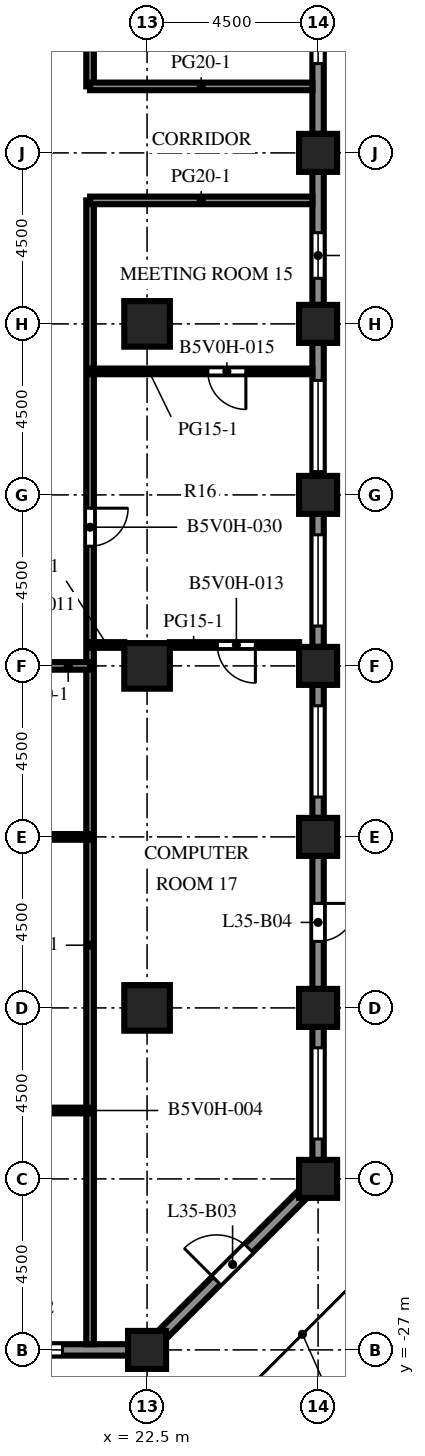
"""IFC4 building model, lengths in metres.
Left out: names, types, materials, properties, quantities, classifications, styles, units other than length and angle.
Written with IfcOpenShell. Run it as: python <this file> out.ifc"""

import sys

from ifc_helpers import new_model, si_unit, direction, frame, frame_2d, origin, origin_2d, place, context, subcontext, project, spatial, rectangle, extrude, element, fill, save


model = new_model("IFC4")
c1 = context("Model", 3, precision=1e-05, world=origin(), true_north=direction((0.0, 1.0)))
c2 = subcontext(c1, "Body", "Model", "MODEL_VIEW")
j1 = project(units=[si_unit("LENGTHUNIT", "METRE"), si_unit("PLANEANGLEUNIT", "RADIAN")], contexts=[c1])
p1 = place(None, origin())
s1 = spatial("IfcSite", under=j1, at=p1, CompositionType="ELEMENT")
p2 = place(p1, origin())
s2 = spatial("IfcBuilding", under=s1, at=p2, CompositionType="ELEMENT")
p3 = place(p2, frame((0.0, 0.0, 156.8)))
s3 = spatial("IfcBuildingStorey", under=s2, at=p3, CompositionType="ELEMENT", Elevation=156.8)
p4 = place(p3, frame((22.5, -27.0, -0.45), z_axis=(0.0, 0.0, 1.0), x_axis=(1.0, 0.0, 0.0)))
e1 = element("IfcColumn", 1, at=p4, inside=s3, PredefinedType="COLUMN", context=c2, shape_type="SweptSolid", body=[
    extrude(rectangle(XDim=1.0, YDim=1.0, at=origin_2d()), origin(), (0.0, 0.0, 1.0), 4.55),
])
for number, where, z_axis, x_axis in (
    (2, (27.0, -22.5, 0.0), (0.0, 0.0, 1.0), (1.0, 0.0, 0.0)),
    (3, (27.0, -18.0, 0.0), (0.0, 0.0, 1.0), (1.0, 0.0, 0.0)),
    (4, (27.0, -13.5, 0.0), (0.0, 0.0, 1.0), (1.0, 0.0, 0.0)),
    (5, (27.0, -9.0, 0.0), (0.0, 0.0, 1.0), (1.0, 0.0, 0.0)),
    (6, (27.0, -4.5, 0.0), (0.0, 0.0, 1.0), (1.0, 0.0, 0.0)),
    (7, (27.0, 0.0, 0.0), (0.0, 0.0, 1.0), (1.0, 0.0, 0.0)),
    (8, (27.0, 4.5, 0.0), (0.0, 0.0, 1.0), (1.0, 0.0, 0.0)),
):
    element("IfcColumn", number, at=place(p3, frame(where, z_axis=z_axis, x_axis=x_axis)), inside=s3, PredefinedType="COLUMN", context=c2, shape_type="SweptSolid", body=[
        extrude(rectangle(XDim=1.0, YDim=1.0, at=origin_2d()), origin(), (0.0, 0.0, 1.0), 4.1),
    ])
for number, where, z_axis, x_axis in (
    (9, (22.5, -18.0, 0.0), (0.0, 0.0, 1.0), (1.0, 0.0, 0.0)),
    (10, (22.5, -9.0, 0.0), (0.0, 0.0, 1.0), (1.0, 0.0, 0.0)),
    (11, (22.5, 0.0, 0.0), (0.0, 0.0, 1.0), (1.0, 0.0, 0.0)),
):
    element("IfcColumn", number, at=place(p3, frame(where, z_axis=z_axis, x_axis=x_axis)), inside=s3, PredefinedType="COLUMN", context=c2, shape_type="SweptSolid", body=[
        extrude(rectangle(XDim=1.2, YDim=1.2, at=origin_2d()), origin(), (0.0, 0.0, 1.0), 4.1),
    ])
p5 = place(p3, frame((22.0, -27.0, 0.0), z_axis=(0.0, 0.0, 1.0), x_axis=(-1.0, 0.0, 0.0)))
e12 = element("IfcWall", 12, at=p5, inside=s3, PredefinedType="SOLIDWALL", context=c2, shape_type="SweptSolid", body=[
    extrude(rectangle(XDim=3.5, YDim=0.3, at=frame_2d((1.75, 0.0))), origin(), (0.0, 0.0, 1.0), 2.85),
])
p6 = place(p5, frame((1.725, 0.0, 0.8)))
e13 = element("IfcOpeningElement", 13, at=p6, cuts=e12, PredefinedType="OPENING", context=c2, shape_type="SweptSolid", body=[
    extrude(rectangle(XDim=1.2, YDim=1.7, at=frame_2d((0.6, 0.85))), frame((0.0, 0.16, 0.0), z_axis=(0.0, -1.0, 0.0), x_axis=(1.0, 0.0, 0.0)), (0.0, 0.0, 1.0), 0.32),
])
p7 = place(p3, frame((26.606, -22.894, 0.0), z_axis=(0.0, 0.0, 1.0), x_axis=(-0.707106781187, -0.707106781187, 0.0)))
e14 = element("IfcWall", 14, at=p7, inside=s3, PredefinedType="SOLIDWALL", context=c2, shape_type="SweptSolid", body=[
    extrude(rectangle(XDim=5.25, YDim=0.3, at=frame_2d((2.625, 0.0))), origin(), (0.0, 0.0, 1.0), 2.85),
])
p8 = place(p7, frame((2.025, 0.0, 0.0)))
e15 = element("IfcOpeningElement", 15, at=p8, cuts=e14, PredefinedType="OPENING", context=c2, shape_type="SweptSolid", body=[
    extrude(rectangle(XDim=1.2, YDim=2.2, at=frame_2d((0.6, 1.1))), frame((0.0, 0.16, 0.0), z_axis=(0.0, -1.0, 0.0), x_axis=(1.0, 0.0, 0.0)), (0.0, 0.0, 1.0), 0.32),
])
p9 = place(p3, frame((27.0, -18.5, 0.0), z_axis=(0.0, 0.0, 1.0), x_axis=(0.0, -1.0, 0.0)))
e16 = element("IfcWall", 16, at=p9, inside=s3, PredefinedType="SOLIDWALL", context=c2, shape_type="SweptSolid", body=[
    extrude(rectangle(XDim=3.5, YDim=0.3, at=frame_2d((1.75, 0.0))), origin(), (0.0, 0.0, 1.0), 2.85),
])
p10 = place(p9, frame((0.55, 0.0, 0.8)))
e17 = element("IfcOpeningElement", 17, at=p10, cuts=e16, PredefinedType="OPENING", context=c2, shape_type="SweptSolid", body=[
    extrude(rectangle(XDim=2.4, YDim=1.7, at=frame_2d((1.2, 0.85))), frame((0.0, 0.16, 0.0), z_axis=(0.0, -1.0, 0.0), x_axis=(1.0, 0.0, 0.0)), (0.0, 0.0, 1.0), 0.32),
])
p11 = place(p3, frame((27.0, -14.0, 0.0), z_axis=(0.0, 0.0, 1.0), x_axis=(0.0, -1.0, 0.0)))
e18 = element("IfcWall", 18, at=p11, inside=s3, PredefinedType="SOLIDWALL", context=c2, shape_type="SweptSolid", body=[
    extrude(rectangle(XDim=3.5, YDim=0.3, at=frame_2d((1.75, 0.0))), origin(), (0.0, 0.0, 1.0), 2.85),
])
p12 = place(p11, frame((1.25, 0.0, 0.0)))
e19 = element("IfcOpeningElement", 19, at=p12, cuts=e18, PredefinedType="OPENING", context=c2, shape_type="SweptSolid", body=[
    extrude(rectangle(XDim=1.0, YDim=2.2, at=frame_2d((0.5, 1.1))), frame((0.0, 0.16, 0.0), z_axis=(0.0, -1.0, 0.0), x_axis=(1.0, 0.0, 0.0)), (0.0, 0.0, 1.0), 0.32),
])
p13 = place(p3, frame((27.0, -9.5, 0.0), z_axis=(0.0, 0.0, 1.0), x_axis=(0.0, -1.0, 0.0)))
e20 = element("IfcWall", 20, at=p13, inside=s3, PredefinedType="SOLIDWALL", context=c2, shape_type="SweptSolid", body=[
    extrude(rectangle(XDim=3.5, YDim=0.3, at=frame_2d((1.75, 0.0))), origin(), (0.0, 0.0, 1.0), 2.85),
])
p14 = place(p13, frame((0.55, 0.0, 0.8)))
e21 = element("IfcOpeningElement", 21, at=p14, cuts=e20, PredefinedType="OPENING", context=c2, shape_type="SweptSolid", body=[
    extrude(rectangle(XDim=2.4, YDim=1.7, at=frame_2d((1.2, 0.85))), frame((0.0, 0.16, 0.0), z_axis=(0.0, -1.0, 0.0), x_axis=(1.0, 0.0, 0.0)), (0.0, 0.0, 1.0), 0.32),
])
p15 = place(p3, frame((27.0, -5.0, 0.0), z_axis=(0.0, 0.0, 1.0), x_axis=(0.0, -1.0, 0.0)))
e22 = element("IfcWall", 22, at=p15, inside=s3, PredefinedType="SOLIDWALL", context=c2, shape_type="SweptSolid", body=[
    extrude(rectangle(XDim=3.5, YDim=0.3, at=frame_2d((1.75, 0.0))), origin(), (0.0, 0.0, 1.0), 2.85),
])
p16 = place(p15, frame((0.55, 0.0, 0.8)))
e23 = element("IfcOpeningElement", 23, at=p16, cuts=e22, PredefinedType="OPENING", context=c2, shape_type="SweptSolid", body=[
    extrude(rectangle(XDim=2.4, YDim=1.7, at=frame_2d((1.2, 0.85))), frame((0.0, 0.16, 0.0), z_axis=(0.0, -1.0, 0.0), x_axis=(1.0, 0.0, 0.0)), (0.0, 0.0, 1.0), 0.32),
])
p17 = place(p3, frame((27.0, -0.5, 0.0), z_axis=(0.0, 0.0, 1.0), x_axis=(0.0, -1.0, 0.0)))
e24 = element("IfcWall", 24, at=p17, inside=s3, PredefinedType="SOLIDWALL", context=c2, shape_type="SweptSolid", body=[
    extrude(rectangle(XDim=3.5, YDim=0.3, at=frame_2d((1.75, 0.0))), origin(), (0.0, 0.0, 1.0), 2.85),
])
p18 = place(p17, frame((0.988, 0.0, 0.8)))
e25 = element("IfcOpeningElement", 25, at=p18, cuts=e24, PredefinedType="OPENING", context=c2, shape_type="SweptSolid", body=[
    extrude(rectangle(XDim=2.4, YDim=1.7, at=frame_2d((1.2, 0.85))), frame((0.0, 0.16, 0.0), z_axis=(0.0, -1.0, 0.0), x_axis=(1.0, 0.0, 0.0)), (0.0, 0.0, 1.0), 0.32),
])
p19 = place(p3, frame((27.0, 4.0, 0.0), z_axis=(0.0, 0.0, 1.0), x_axis=(0.0, -1.0, 0.0)))
e26 = element("IfcWall", 26, at=p19, inside=s3, PredefinedType="SOLIDWALL", context=c2, shape_type="SweptSolid", body=[
    extrude(rectangle(XDim=3.5, YDim=0.3, at=frame_2d((1.75, 0.0))), origin(), (0.0, 0.0, 1.0), 2.85),
])
p20 = place(p19, frame((1.6, 0.0, 0.8)))
e27 = element("IfcOpeningElement", 27, at=p20, cuts=e26, PredefinedType="OPENING", context=c2, shape_type="SweptSolid", body=[
    extrude(rectangle(XDim=1.2, YDim=1.7, at=frame_2d((0.6, 0.85))), frame((0.0, 0.16, 0.0), z_axis=(0.0, -1.0, 0.0), x_axis=(1.0, 0.0, 0.0)), (0.0, 0.0, 1.0), 0.32),
])
p21 = place(p3, frame((27.0, 8.5, 0.0), z_axis=(0.0, 0.0, 1.0), x_axis=(0.0, -1.0, 0.0)))
e28 = element("IfcWall", 28, at=p21, inside=s3, PredefinedType="SOLIDWALL", context=c2, shape_type="SweptSolid", body=[
    extrude(rectangle(XDim=3.5, YDim=0.3, at=frame_2d((1.75, 0.0))), origin(), (0.0, 0.0, 1.0), 2.85),
])
p22 = place(p21, frame((0.45, 0.0, 0.8)))
e29 = element("IfcOpeningElement", 29, at=p22, cuts=e28, PredefinedType="OPENING", context=c2, shape_type="SweptSolid", body=[
    extrude(rectangle(XDim=1.2, YDim=1.7, at=frame_2d((0.6, 0.85))), frame((0.0, 0.16, 0.0), z_axis=(0.0, -1.0, 0.0), x_axis=(1.0, 0.0, 0.0)), (0.0, 0.0, 1.0), 0.32),
])
p23 = place(p3, frame((21.0, 3.25, 0.0), z_axis=(0.0, 0.0, 1.0), x_axis=(0.0, -1.0, 0.0)))
e30 = element("IfcWall", 30, at=p23, inside=s3, PredefinedType="PARTITIONING", context=c2, shape_type="SweptSolid", body=[
    extrude(rectangle(XDim=30.1, YDim=0.2, at=frame_2d((15.05, 0.0))), origin(), (0.0, 0.0, 1.0), 3.65),
])
p24 = place(p23, frame((8.1, 0.0, 0.0)))
e31 = element("IfcOpeningElement", 31, at=p24, cuts=e30, PredefinedType="OPENING", context=c2, shape_type="SweptSolid", body=[
    extrude(rectangle(XDim=1.0, YDim=2.1, at=frame_2d((0.5, 1.05))), frame((0.0, 0.11, 0.0), z_axis=(0.0, -1.0, 0.0), x_axis=(1.0, 0.0, 0.0)), (0.0, 0.0, 1.0), 0.22),
])
p25 = place(p3, frame((21.0, 26.85, 0.0), z_axis=(0.0, 0.0, 1.0), x_axis=(0.0, -1.0, 0.0)))
e32 = element("IfcWall", 32, at=p25, inside=s3, PredefinedType="PARTITIONING", context=c2, shape_type="SweptSolid", body=[
    extrude(rectangle(XDim=20.6, YDim=0.2, at=frame_2d((10.3, 0.0))), origin(), (0.0, 0.0, 1.0), 3.65),
])
p26 = place(p25, frame((11.25, 0.0, 0.0)))
e33 = element("IfcOpeningElement", 33, at=p26, cuts=e32, PredefinedType="OPENING", context=c2, shape_type="SweptSolid", body=[
    extrude(rectangle(XDim=1.0, YDim=2.1, at=frame_2d((0.5, 1.05))), frame((0.0, 0.11, 0.0), z_axis=(0.0, -1.0, 0.0), x_axis=(1.0, 0.0, 0.0)), (0.0, 0.0, 1.0), 0.22),
])
p27 = place(p3, frame((21.0, -20.7, 0.0), z_axis=(0.0, 0.0, 1.0), x_axis=(-1.0, 0.0, 0.0)))
e34 = element("IfcWall", 34, at=p27, inside=s3, PredefinedType="PARTITIONING", context=c2, shape_type="SweptSolid", body=[
    extrude(rectangle(XDim=34.5, YDim=0.15, at=frame_2d((17.25, 0.0))), origin(), (0.0, 0.0, 1.0), 3.65),
])
p28 = place(p27, frame((26.9, 0.0, 0.0)))
e35 = element("IfcOpeningElement", 35, at=p28, cuts=e34, PredefinedType="OPENING", context=c2, shape_type="SweptSolid", body=[
    extrude(rectangle(XDim=1.0, YDim=2.1, at=frame_2d((0.5, 1.05))), frame((0.0, 0.085, 0.0), z_axis=(0.0, -1.0, 0.0), x_axis=(1.0, 0.0, 0.0)), (0.0, 0.0, 1.0), 0.17),
])
p29 = place(p27, frame((18.25, 0.0, 0.0)))
e36 = element("IfcOpeningElement", 36, at=p29, cuts=e34, PredefinedType="OPENING", context=c2, shape_type="SweptSolid", body=[
    extrude(rectangle(XDim=1.0, YDim=2.1, at=frame_2d((0.5, 1.05))), frame((0.0, 0.085, 0.0), z_axis=(0.0, -1.0, 0.0), x_axis=(1.0, 0.0, 0.0)), (0.0, 0.0, 1.0), 0.17),
])
p30 = place(p27, frame((12.65, 0.0, 0.0)))
e37 = element("IfcOpeningElement", 37, at=p30, cuts=e34, PredefinedType="OPENING", context=c2, shape_type="SweptSolid", body=[
    extrude(rectangle(XDim=1.0, YDim=2.1, at=frame_2d((0.5, 1.05))), frame((0.0, 0.085, 0.0), z_axis=(0.0, -1.0, 0.0), x_axis=(1.0, 0.0, 0.0)), (0.0, 0.0, 1.0), 0.17),
])
p31 = place(p27, frame((1.4, 0.0, 0.0)))
e38 = element("IfcOpeningElement", 38, at=p31, cuts=e34, PredefinedType="OPENING", context=c2, shape_type="SweptSolid", body=[
    extrude(rectangle(XDim=1.0, YDim=2.1, at=frame_2d((0.5, 1.05))), frame((0.0, 0.085, 0.0), z_axis=(0.0, -1.0, 0.0), x_axis=(1.0, 0.0, 0.0)), (0.0, 0.0, 1.0), 0.17),
])
p32 = place(p3, frame((21.0, -13.5, 0.0), z_axis=(0.0, 0.0, 1.0), x_axis=(-1.0, 0.0, 0.0)))
e39 = element("IfcWall", 39, at=p32, inside=s3, PredefinedType="PARTITIONING", context=c2, shape_type="SweptSolid", body=[
    extrude(rectangle(XDim=34.5, YDim=0.15, at=frame_2d((17.25, 0.0))), origin(), (0.0, 0.0, 1.0), 3.65),
])
p33 = place(p32, frame((27.4, 0.0, 0.0)))
e40 = element("IfcOpeningElement", 40, at=p33, cuts=e39, PredefinedType="OPENING", context=c2, shape_type="SweptSolid", body=[
    extrude(rectangle(XDim=1.0, YDim=2.1, at=frame_2d((0.5, 1.05))), frame((0.0, 0.085, 0.0), z_axis=(0.0, -1.0, 0.0), x_axis=(1.0, 0.0, 0.0)), (0.0, 0.0, 1.0), 0.17),
])
p34 = place(p32, frame((17.5, 0.0, 0.0)))
e41 = element("IfcOpeningElement", 41, at=p34, cuts=e39, PredefinedType="OPENING", context=c2, shape_type="SweptSolid", body=[
    extrude(rectangle(XDim=1.0, YDim=2.1, at=frame_2d((0.5, 1.05))), frame((0.0, 0.085, 0.0), z_axis=(0.0, -1.0, 0.0), x_axis=(1.0, 0.0, 0.0)), (0.0, 0.0, 1.0), 0.17),
])
p35 = place(p32, frame((10.4, 0.0, 0.0)))
e42 = element("IfcOpeningElement", 42, at=p35, cuts=e39, PredefinedType="OPENING", context=c2, shape_type="SweptSolid", body=[
    extrude(rectangle(XDim=1.0, YDim=2.1, at=frame_2d((0.5, 1.05))), frame((0.0, 0.085, 0.0), z_axis=(0.0, -1.0, 0.0), x_axis=(1.0, 0.0, 0.0)), (0.0, 0.0, 1.0), 0.17),
])
p36 = place(p32, frame((3.65, 0.0, 0.0)))
e43 = element("IfcOpeningElement", 43, at=p36, cuts=e39, PredefinedType="OPENING", context=c2, shape_type="SweptSolid", body=[
    extrude(rectangle(XDim=1.0, YDim=2.1, at=frame_2d((0.5, 1.05))), frame((0.0, 0.085, 0.0), z_axis=(0.0, -1.0, 0.0), x_axis=(1.0, 0.0, 0.0)), (0.0, 0.0, 1.0), 0.17),
])
p37 = place(p3, frame((21.0, -9.0, 0.0), z_axis=(0.0, 0.0, 1.0), x_axis=(-1.0, 0.0, 0.0)))
e44 = element("IfcWall", 44, at=p37, inside=s3, PredefinedType="PARTITIONING", context=c2, shape_type="SweptSolid", body=[
    extrude(rectangle(XDim=3.0, YDim=0.2, at=frame_2d((1.5, 0.0))), origin(), (0.0, 0.0, 1.0), 3.65),
])
p38 = place(p37, frame((1.15, 0.0, 0.0)))
e45 = element("IfcOpeningElement", 45, at=p38, cuts=e44, PredefinedType="OPENING", context=c2, shape_type="SweptSolid", body=[
    extrude(rectangle(XDim=1.0, YDim=2.1, at=frame_2d((0.5, 1.05))), frame((0.0, 0.11, 0.0), z_axis=(0.0, -1.0, 0.0), x_axis=(1.0, 0.0, 0.0)), (0.0, 0.0, 1.0), 0.22),
])
p39 = place(p3, frame((21.0, -8.45, 0.0), z_axis=(0.0, 0.0, 1.0), x_axis=(1.0, 0.0, 0.0)))
e46 = element("IfcWall", 46, at=p39, inside=s3, PredefinedType="PARTITIONING", context=c2, shape_type="SweptSolid", body=[
    extrude(rectangle(XDim=0.9, YDim=0.15, at=frame_2d((0.45, 0.0))), origin(), (0.0, 0.0, 1.0), 3.65),
])
p40 = place(p3, frame((26.5, -8.45, 0.0), z_axis=(0.0, 0.0, 1.0), x_axis=(-1.0, 0.0, 0.0)))
e47 = element("IfcWall", 47, at=p40, inside=s3, PredefinedType="PARTITIONING", context=c2, shape_type="SweptSolid", body=[
    extrude(rectangle(XDim=3.4, YDim=0.15, at=frame_2d((1.7, 0.0))), origin(), (0.0, 0.0, 1.0), 3.65),
])
p41 = place(p40, frame((1.15, 0.0, 0.0)))
e48 = element("IfcOpeningElement", 48, at=p41, cuts=e47, PredefinedType="OPENING", context=c2, shape_type="SweptSolid", body=[
    extrude(rectangle(XDim=1.0, YDim=2.1, at=frame_2d((0.5, 1.05))), frame((0.0, 0.085, 0.0), z_axis=(0.0, -1.0, 0.0), x_axis=(1.0, 0.0, 0.0)), (0.0, 0.0, 1.0), 0.17),
])
p42 = place(p3, frame((21.0, -1.25, 0.0), z_axis=(0.0, 0.0, 1.0), x_axis=(1.0, 0.0, 0.0)))
e49 = element("IfcWall", 49, at=p42, inside=s3, PredefinedType="PARTITIONING", context=c2, shape_type="SweptSolid", body=[
    extrude(rectangle(XDim=5.85, YDim=0.15, at=frame_2d((2.925, 0.0))), origin(), (0.0, 0.0, 1.0), 3.65),
])
p43 = place(p42, frame((3.1, 0.0, 0.0)))
e50 = element("IfcOpeningElement", 50, at=p43, cuts=e49, PredefinedType="OPENING", context=c2, shape_type="SweptSolid", body=[
    extrude(rectangle(XDim=1.0, YDim=2.1, at=frame_2d((0.5, 1.05))), frame((0.0, 0.085, 0.0), z_axis=(0.0, -1.0, 0.0), x_axis=(1.0, 0.0, 0.0)), (0.0, 0.0, 1.0), 0.17),
])
for number, where, z_axis, x_axis in (
    (51, (21.0, 3.25, 0.0), (0.0, 0.0, 1.0), (1.0, 0.0, 0.0)),
    (52, (21.0, 6.25, 0.0), (0.0, 0.0, 1.0), (1.0, 0.0, 0.0)),
):
    element("IfcWall", number, at=place(p3, frame(where, z_axis=z_axis, x_axis=x_axis)), inside=s3, PredefinedType="PARTITIONING", context=c2, shape_type="SweptSolid", body=[
        extrude(rectangle(XDim=5.85, YDim=0.2, at=frame_2d((2.925, 0.0))), origin(), (0.0, 0.0, 1.0), 3.65),
    ])
p44 = place(p6, origin())
e53 = element("IfcWindow", 53, at=p44, inside=s3, PartitioningType="SINGLE_PANEL", PredefinedType="WINDOW", context=c2, shape_type="SweptSolid", body=[
    extrude(rectangle(XDim=1.2, YDim=1.7, at=frame_2d((0.6, 0.85))), frame((0.0, 0.03, 0.0), z_axis=(0.0, -1.0, 0.0), x_axis=(1.0, 0.0, 0.0)), (0.0, 0.0, 1.0), 0.06),
])
fill(e13, e53)
p45 = place(p8, origin())
e54 = element("IfcDoor", 54, at=p45, inside=s3, OperationType="SINGLE_SWING_RIGHT", PredefinedType="DOOR", context=c2, shape_type="SweptSolid", body=[
    extrude(rectangle(XDim=1.2, YDim=2.2, at=frame_2d((0.6, 1.1))), frame((0.0, 0.025, 0.0), z_axis=(0.0, -1.0, 0.0), x_axis=(1.0, 0.0, 0.0)), (0.0, 0.0, 1.0), 0.05),
])
fill(e15, e54)
p46 = place(p10, origin())
e55 = element("IfcWindow", 55, at=p46, inside=s3, PartitioningType="SINGLE_PANEL", PredefinedType="WINDOW", context=c2, shape_type="SweptSolid", body=[
    extrude(rectangle(XDim=2.4, YDim=1.7, at=frame_2d((1.2, 0.85))), frame((0.0, 0.03, 0.0), z_axis=(0.0, -1.0, 0.0), x_axis=(1.0, 0.0, 0.0)), (0.0, 0.0, 1.0), 0.06),
])
fill(e17, e55)
p47 = place(p12, origin())
e56 = element("IfcDoor", 56, at=p47, inside=s3, OperationType="SINGLE_SWING_LEFT", PredefinedType="DOOR", context=c2, shape_type="SweptSolid", body=[
    extrude(rectangle(XDim=1.0, YDim=2.2, at=frame_2d((0.5, 1.1))), frame((0.0, 0.025, 0.0), z_axis=(0.0, -1.0, 0.0), x_axis=(1.0, 0.0, 0.0)), (0.0, 0.0, 1.0), 0.05),
])
fill(e19, e56)
p48 = place(p14, origin())
e57 = element("IfcWindow", 57, at=p48, inside=s3, PartitioningType="SINGLE_PANEL", PredefinedType="WINDOW", context=c2, shape_type="SweptSolid", body=[
    extrude(rectangle(XDim=2.4, YDim=1.7, at=frame_2d((1.2, 0.85))), frame((0.0, 0.03, 0.0), z_axis=(0.0, -1.0, 0.0), x_axis=(1.0, 0.0, 0.0)), (0.0, 0.0, 1.0), 0.06),
])
fill(e21, e57)
p49 = place(p16, origin())
e58 = element("IfcWindow", 58, at=p49, inside=s3, PartitioningType="SINGLE_PANEL", PredefinedType="WINDOW", context=c2, shape_type="SweptSolid", body=[
    extrude(rectangle(XDim=2.4, YDim=1.7, at=frame_2d((1.2, 0.85))), frame((0.0, 0.03, 0.0), z_axis=(0.0, -1.0, 0.0), x_axis=(1.0, 0.0, 0.0)), (0.0, 0.0, 1.0), 0.06),
])
fill(e23, e58)
p50 = place(p18, origin())
e59 = element("IfcWindow", 59, at=p50, inside=s3, PartitioningType="SINGLE_PANEL", PredefinedType="WINDOW", context=c2, shape_type="SweptSolid", body=[
    extrude(rectangle(XDim=2.4, YDim=1.7, at=frame_2d((1.2, 0.85))), frame((0.0, 0.03, 0.0), z_axis=(0.0, -1.0, 0.0), x_axis=(1.0, 0.0, 0.0)), (0.0, 0.0, 1.0), 0.06),
])
fill(e25, e59)
p51 = place(p20, origin())
e60 = element("IfcWindow", 60, at=p51, inside=s3, PartitioningType="SINGLE_PANEL", PredefinedType="WINDOW", context=c2, shape_type="SweptSolid", body=[
    extrude(rectangle(XDim=1.2, YDim=1.7, at=frame_2d((0.6, 0.85))), frame((0.0, 0.03, 0.0), z_axis=(0.0, -1.0, 0.0), x_axis=(1.0, 0.0, 0.0)), (0.0, 0.0, 1.0), 0.06),
])
fill(e27, e60)
p52 = place(p22, origin())
e61 = element("IfcWindow", 61, at=p52, inside=s3, PartitioningType="SINGLE_PANEL", PredefinedType="WINDOW", context=c2, shape_type="SweptSolid", body=[
    extrude(rectangle(XDim=1.2, YDim=1.7, at=frame_2d((0.6, 0.85))), frame((0.0, 0.03, 0.0), z_axis=(0.0, -1.0, 0.0), x_axis=(1.0, 0.0, 0.0)), (0.0, 0.0, 1.0), 0.06),
])
fill(e29, e61)
p53 = place(p41, origin())
e62 = element("IfcDoor", 62, at=p53, inside=s3, OperationType="SINGLE_SWING_LEFT", PredefinedType="DOOR", context=c2, shape_type="SweptSolid", body=[
    extrude(rectangle(XDim=1.0, YDim=2.1, at=frame_2d((0.5, 1.05))), frame((0.0, 0.025, 0.0), z_axis=(0.0, -1.0, 0.0), x_axis=(1.0, 0.0, 0.0)), (0.0, 0.0, 1.0), 0.05),
])
fill(e48, e62)
p54 = place(p43, origin())
e63 = element("IfcDoor", 63, at=p54, inside=s3, OperationType="SINGLE_SWING_RIGHT", PredefinedType="DOOR", context=c2, shape_type="SweptSolid", body=[
    extrude(rectangle(XDim=1.0, YDim=2.1, at=frame_2d((0.5, 1.05))), frame((0.0, 0.025, 0.0), z_axis=(0.0, -1.0, 0.0), x_axis=(1.0, 0.0, 0.0)), (0.0, 0.0, 1.0), 0.05),
])
fill(e50, e63)
p55 = place(p24, origin())
e64 = element("IfcDoor", 64, at=p55, inside=s3, OperationType="SINGLE_SWING_LEFT", PredefinedType="DOOR", context=c2, shape_type="SweptSolid", body=[
    extrude(rectangle(XDim=1.0, YDim=2.1, at=frame_2d((0.5, 1.05))), frame((0.0, 0.025, 0.0), z_axis=(0.0, -1.0, 0.0), x_axis=(1.0, 0.0, 0.0)), (0.0, 0.0, 1.0), 0.05),
])
fill(e31, e64)
save(model, sys.argv[1])
